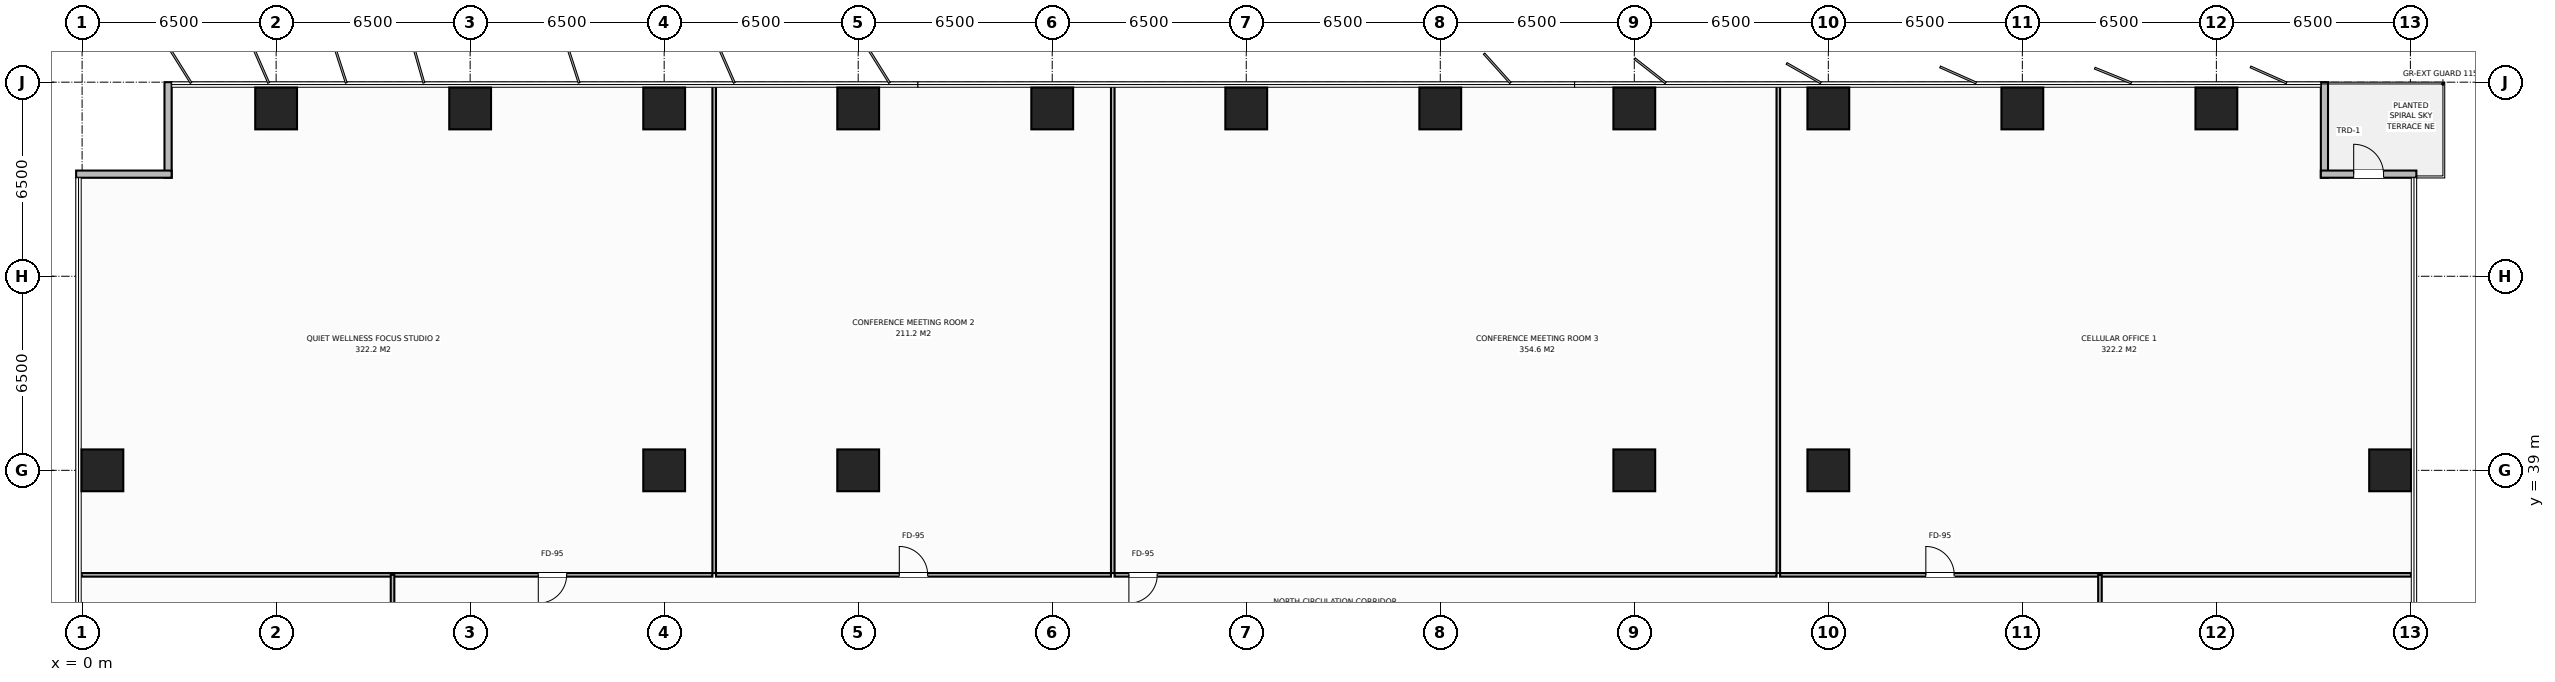
"""IFC4 building model, lengths in metres.
Left out: names, types, materials, properties, quantities, classifications, styles, units other than length and angle.
Written with IfcOpenShell. Run it as: python <this file> out.ifc"""

import sys

from ifc_helpers import new_model, si_unit, direction, frame, frame_2d, origin, origin_2d, place, context, subcontext, project, spatial, rectangle, extrude, element, fill, save


model = new_model("IFC4")
c1 = context("Model", 3, precision=1e-05, world=origin(), true_north=direction((0.0, 1.0)))
c2 = subcontext(c1, "Body", "Model", "MODEL_VIEW")
j1 = project(units=[si_unit("LENGTHUNIT", "METRE"), si_unit("PLANEANGLEUNIT", "RADIAN")], contexts=[c1])
p1 = place(None, origin())
s1 = spatial("IfcSite", under=j1, at=p1, CompositionType="ELEMENT")
p2 = place(p1, origin())
s2 = spatial("IfcBuilding", under=s1, at=p2, CompositionType="ELEMENT")
p3 = place(p2, frame((0.0, 0.0, 69.6)))
s3 = spatial("IfcBuildingStorey", under=s2, at=p3, CompositionType="ELEMENT", Elevation=69.6)
for number, where, z_axis, x_axis in (
    (1, (19.5, 39.0, 0.0), (0.0, 0.0, 1.0), (1.0, 0.0, 0.0)),
    (2, (58.5, 39.0, 0.0), (0.0, 0.0, 1.0), (1.0, 0.0, 0.0)),
    (3, (26.0, 39.0, 0.0), (0.0, 0.0, 1.0), (1.0, 0.0, 0.0)),
    (4, (52.0, 39.0, 0.0), (0.0, 0.0, 1.0), (1.0, 0.0, 0.0)),
    (5, (6.5, 51.12, 0.0), (0.0, 0.0, 1.0), (1.0, 0.0, 0.0)),
    (6, (13.0, 51.12, 0.0), (0.0, 0.0, 1.0), (1.0, 0.0, 0.0)),
    (7, (19.5, 51.12, 0.0), (0.0, 0.0, 1.0), (1.0, 0.0, 0.0)),
    (8, (26.0, 51.12, 0.0), (0.0, 0.0, 1.0), (1.0, 0.0, 0.0)),
    (9, (32.5, 51.12, 0.0), (0.0, 0.0, 1.0), (1.0, 0.0, 0.0)),
    (10, (39.0, 51.12, 0.0), (0.0, 0.0, 1.0), (1.0, 0.0, 0.0)),
    (11, (45.5, 51.12, 0.0), (0.0, 0.0, 1.0), (1.0, 0.0, 0.0)),
    (12, (52.0, 51.12, 0.0), (0.0, 0.0, 1.0), (1.0, 0.0, 0.0)),
    (13, (58.5, 51.12, 0.0), (0.0, 0.0, 1.0), (1.0, 0.0, 0.0)),
    (14, (65.0, 51.12, 0.0), (0.0, 0.0, 1.0), (1.0, 0.0, 0.0)),
    (15, (71.5, 51.12, 0.0), (0.0, 0.0, 1.0), (1.0, 0.0, 0.0)),
    (16, (0.68, 39.0, 0.0), (0.0, 0.0, 1.0), (1.0, 0.0, 0.0)),
    (17, (77.32, 39.0, 0.0), (0.0, 0.0, 1.0), (1.0, 0.0, 0.0)),
):
    element("IfcColumn", number, at=place(p3, frame(where, z_axis=z_axis, x_axis=x_axis)), inside=s3, PredefinedType="COLUMN", context=c2, shape_type="SweptSolid", body=[
        extrude(rectangle(XDim=1.4, YDim=1.4, at=origin_2d()), origin(), (0.0, 0.0, 1.0), 3.8),
    ])
for number, where, z_axis, x_axis in (
    (18, (2.88, 48.8, 0.0), (0.0, 0.0, 1.0), (0.0, 1.0, 0.0)),
    (19, (-0.2, 48.92, 0.0), (0.0, 0.0, 1.0), (1.0, 0.0, 0.0)),
    (20, (75.12, 52.0, 0.0), (0.0, 0.0, 1.0), (0.0, -1.0, 0.0)),
):
    element("IfcWall", number, at=place(p3, frame(where, z_axis=z_axis, x_axis=x_axis)), inside=s3, PredefinedType="STANDARD", context=c2, shape_type="SweptSolid", body=[
        extrude(rectangle(XDim=3.2, YDim=0.24, at=frame_2d((1.6, 0.0))), origin(), (0.0, 0.0, 1.0), 3.55),
    ])
p4 = place(p3, frame((75.0, 48.92, 0.0), z_axis=(0.0, 0.0, 1.0), x_axis=(1.0, 0.0, 0.0)))
e21 = element("IfcWall", 21, at=p4, inside=s3, PredefinedType="STANDARD", context=c2, shape_type="SweptSolid", body=[
    extrude(rectangle(XDim=3.2, YDim=0.24, at=frame_2d((1.6, 0.0))), origin(), (0.0, 0.0, 1.0), 3.55),
])
p5 = place(p4, frame((1.1, 0.0, 0.0)))
e22 = element("IfcOpeningElement", 22, at=p5, cuts=e21, PredefinedType="OPENING", context=c2, shape_type="SweptSolid", body=[
    extrude(rectangle(XDim=1.0, YDim=2.2, at=frame_2d((0.5, 1.1))), frame((0.0, 0.13, 0.0), z_axis=(0.0, -1.0, 0.0), x_axis=(1.0, 0.0, 0.0)), (0.0, 0.0, 1.0), 0.26),
])
p6 = place(p3, frame((21.176, 35.56, 0.0), z_axis=(0.0, 0.0, 1.0), x_axis=(0.0, 1.0, 0.0)))
e23 = element("IfcWall", 23, at=p6, inside=s3, PredefinedType="PARTITIONING", context=c2, shape_type="SweptSolid", body=[
    extrude(rectangle(XDim=16.42, YDim=0.12, at=frame_2d((8.21, 0.0))), origin(), (0.0, 0.0, 1.0), 3.55),
])
p7 = place(p3, frame((-0.02, 35.5, 0.0), z_axis=(0.0, 0.0, 1.0), x_axis=(1.0, 0.0, 0.0)))
e24 = element("IfcWall", 24, at=p7, inside=s3, PredefinedType="PARTITIONING", context=c2, shape_type="SweptSolid", body=[
    extrude(rectangle(XDim=21.136, YDim=0.12, at=frame_2d((10.568, 0.0))), origin(), (0.0, 0.0, 1.0), 3.55),
])
p8 = place(p7, frame((15.303, 0.0, 0.0)))
e25 = element("IfcOpeningElement", 25, at=p8, cuts=e24, PredefinedType="OPENING", context=c2, shape_type="SweptSolid", body=[
    extrude(rectangle(XDim=0.95, YDim=2.15, at=frame_2d((0.475, 1.075))), frame((0.0, 0.07, 0.0), z_axis=(0.0, -1.0, 0.0), x_axis=(1.0, 0.0, 0.0)), (0.0, 0.0, 1.0), 0.14),
])
p9 = place(p3, frame((34.528, 35.56, 0.0), z_axis=(0.0, 0.0, 1.0), x_axis=(0.0, 1.0, 0.0)))
e26 = element("IfcWall", 26, at=p9, inside=s3, PredefinedType="PARTITIONING", context=c2, shape_type="SweptSolid", body=[
    extrude(rectangle(XDim=16.42, YDim=0.12, at=frame_2d((8.21, 0.0))), origin(), (0.0, 0.0, 1.0), 3.55),
])
p10 = place(p3, frame((21.236, 35.5, 0.0), z_axis=(0.0, 0.0, 1.0), x_axis=(1.0, 0.0, 0.0)))
e27 = element("IfcWall", 27, at=p10, inside=s3, PredefinedType="PARTITIONING", context=c2, shape_type="SweptSolid", body=[
    extrude(rectangle(XDim=13.233, YDim=0.12, at=frame_2d((6.616, 0.0))), origin(), (0.0, 0.0, 1.0), 3.55),
])
p11 = place(p10, frame((6.141, 0.0, 0.0)))
e28 = element("IfcOpeningElement", 28, at=p11, cuts=e27, PredefinedType="OPENING", context=c2, shape_type="SweptSolid", body=[
    extrude(rectangle(XDim=0.95, YDim=2.15, at=frame_2d((0.475, 1.075))), frame((0.0, 0.07, 0.0), z_axis=(0.0, -1.0, 0.0), x_axis=(1.0, 0.0, 0.0)), (0.0, 0.0, 1.0), 0.14),
])
p12 = place(p3, frame((56.824, 35.56, 0.0), z_axis=(0.0, 0.0, 1.0), x_axis=(0.0, 1.0, 0.0)))
e29 = element("IfcWall", 29, at=p12, inside=s3, PredefinedType="PARTITIONING", context=c2, shape_type="SweptSolid", body=[
    extrude(rectangle(XDim=16.42, YDim=0.12, at=frame_2d((8.21, 0.0))), origin(), (0.0, 0.0, 1.0), 3.55),
])
p13 = place(p3, frame((34.588, 35.5, 0.0), z_axis=(0.0, 0.0, 1.0), x_axis=(1.0, 0.0, 0.0)))
e30 = element("IfcWall", 30, at=p13, inside=s3, PredefinedType="PARTITIONING", context=c2, shape_type="SweptSolid", body=[
    extrude(rectangle(XDim=22.176, YDim=0.12, at=frame_2d((11.088, 0.0))), origin(), (0.0, 0.0, 1.0), 3.55),
])
p14 = place(p13, frame((0.48, 0.0, 0.0)))
e31 = element("IfcOpeningElement", 31, at=p14, cuts=e30, PredefinedType="OPENING", context=c2, shape_type="SweptSolid", body=[
    extrude(rectangle(XDim=0.95, YDim=2.15, at=frame_2d((0.475, 1.075))), frame((0.0, 0.07, 0.0), z_axis=(0.0, -1.0, 0.0), x_axis=(1.0, 0.0, 0.0)), (0.0, 0.0, 1.0), 0.14),
])
p15 = place(p3, frame((56.884, 35.5, 0.0), z_axis=(0.0, 0.0, 1.0), x_axis=(1.0, 0.0, 0.0)))
e32 = element("IfcWall", 32, at=p15, inside=s3, PredefinedType="PARTITIONING", context=c2, shape_type="SweptSolid", body=[
    extrude(rectangle(XDim=21.136, YDim=0.12, at=frame_2d((10.568, 0.0))), origin(), (0.0, 0.0, 1.0), 3.55),
])
p16 = place(p15, frame((4.883, 0.0, 0.0)))
e33 = element("IfcOpeningElement", 33, at=p16, cuts=e32, PredefinedType="OPENING", context=c2, shape_type="SweptSolid", body=[
    extrude(rectangle(XDim=0.95, YDim=2.15, at=frame_2d((0.475, 1.075))), frame((0.0, 0.07, 0.0), z_axis=(0.0, -1.0, 0.0), x_axis=(1.0, 0.0, 0.0)), (0.0, 0.0, 1.0), 0.14),
])
p17 = place(p3, frame((10.4, 18.6, 0.0), z_axis=(0.0, 0.0, 1.0), x_axis=(0.0, 1.0, 0.0)))
e34 = element("IfcWall", 34, at=p17, inside=s3, PredefinedType="PARTITIONING", context=c2, shape_type="SweptSolid", body=[
    extrude(rectangle(XDim=16.9, YDim=0.12, at=frame_2d((8.45, 0.0))), origin(), (0.0, 0.0, 1.0), 3.55),
])
p18 = place(p17, frame((6.925, 0.0, 0.0)))
e35 = element("IfcOpeningElement", 35, at=p18, cuts=e34, PredefinedType="OPENING", context=c2, shape_type="SweptSolid", body=[
    extrude(rectangle(XDim=0.95, YDim=2.15, at=frame_2d((0.475, 1.075))), frame((0.0, 0.07, 0.0), z_axis=(0.0, -1.0, 0.0), x_axis=(1.0, 0.0, 0.0)), (0.0, 0.0, 1.0), 0.14),
])
p19 = place(p3, frame((67.6, 26.0, 0.0), z_axis=(0.0, 0.0, 1.0), x_axis=(0.0, 1.0, 0.0)))
e36 = element("IfcWall", 36, at=p19, inside=s3, PredefinedType="PARTITIONING", context=c2, shape_type="SweptSolid", body=[
    extrude(rectangle(XDim=9.5, YDim=0.12, at=frame_2d((4.75, 0.0))), origin(), (0.0, 0.0, 1.0), 3.55),
])
p20 = place(p19, frame((3.225, 0.0, 0.0)))
e37 = element("IfcOpeningElement", 37, at=p20, cuts=e36, PredefinedType="OPENING", context=c2, shape_type="SweptSolid", body=[
    extrude(rectangle(XDim=0.95, YDim=2.15, at=frame_2d((0.475, 1.075))), frame((0.0, 0.07, 0.0), z_axis=(0.0, -1.0, 0.0), x_axis=(1.0, 0.0, 0.0)), (0.0, 0.0, 1.0), 0.14),
])
p21 = place(p5, origin())
e38 = element("IfcDoor", 38, at=p21, inside=s3, OperationType="SINGLE_SWING_LEFT", PredefinedType="DOOR", context=c2, shape_type="SweptSolid", body=[
    extrude(rectangle(XDim=1.0, YDim=2.2, at=frame_2d((0.5, 1.1))), frame((0.0, 0.025, 0.0), z_axis=(0.0, -1.0, 0.0), x_axis=(1.0, 0.0, 0.0)), (0.0, 0.0, 1.0), 0.05),
])
fill(e22, e38)
p22 = place(p8, origin())
e39 = element("IfcDoor", 39, at=p22, inside=s3, OperationType="SINGLE_SWING_RIGHT", PredefinedType="DOOR", context=c2, shape_type="SweptSolid", body=[
    extrude(rectangle(XDim=0.95, YDim=2.15, at=frame_2d((0.475, 1.075))), frame((0.0, 0.025, 0.0), z_axis=(0.0, -1.0, 0.0), x_axis=(1.0, 0.0, 0.0)), (0.0, 0.0, 1.0), 0.05),
])
fill(e25, e39)
p23 = place(p11, origin())
e40 = element("IfcDoor", 40, at=p23, inside=s3, OperationType="SINGLE_SWING_LEFT", PredefinedType="DOOR", context=c2, shape_type="SweptSolid", body=[
    extrude(rectangle(XDim=0.95, YDim=2.15, at=frame_2d((0.475, 1.075))), frame((0.0, 0.025, 0.0), z_axis=(0.0, -1.0, 0.0), x_axis=(1.0, 0.0, 0.0)), (0.0, 0.0, 1.0), 0.05),
])
fill(e28, e40)
p24 = place(p14, origin())
e41 = element("IfcDoor", 41, at=p24, inside=s3, OperationType="SINGLE_SWING_RIGHT", PredefinedType="DOOR", context=c2, shape_type="SweptSolid", body=[
    extrude(rectangle(XDim=0.95, YDim=2.15, at=frame_2d((0.475, 1.075))), frame((0.0, 0.025, 0.0), z_axis=(0.0, -1.0, 0.0), x_axis=(1.0, 0.0, 0.0)), (0.0, 0.0, 1.0), 0.05),
])
fill(e31, e41)
p25 = place(p16, origin())
e42 = element("IfcDoor", 42, at=p25, inside=s3, OperationType="SINGLE_SWING_LEFT", PredefinedType="DOOR", context=c2, shape_type="SweptSolid", body=[
    extrude(rectangle(XDim=0.95, YDim=2.15, at=frame_2d((0.475, 1.075))), frame((0.0, 0.025, 0.0), z_axis=(0.0, -1.0, 0.0), x_axis=(1.0, 0.0, 0.0)), (0.0, 0.0, 1.0), 0.05),
])
fill(e33, e42)
save(model, sys.argv[1])
